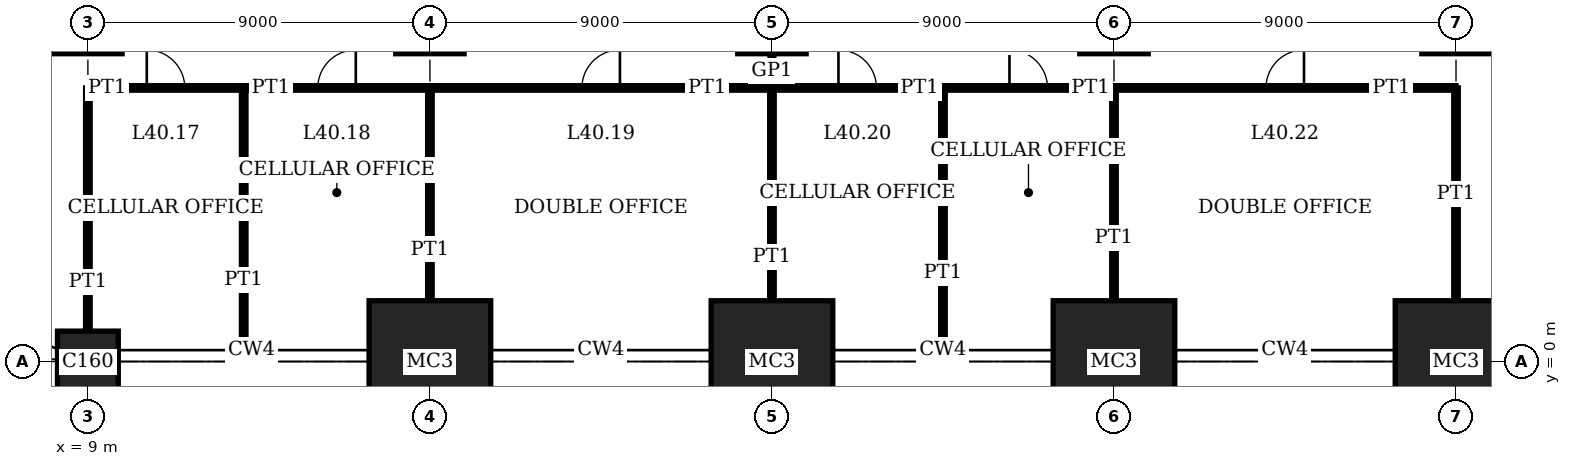
"""IFC4 building model, lengths in metres.
Left out: names, types, materials, properties, quantities, classifications, styles, units other than length and angle.
Written with IfcOpenShell. Run it as: python <this file> out.ifc"""

import sys

from ifc_helpers import new_model, si_unit, direction, frame, frame_2d, origin, origin_2d, place, context, subcontext, project, spatial, rectangle, extrude, element, fill, save


model = new_model("IFC4")
c1 = context("Model", 3, precision=1e-05, world=origin(), true_north=direction((0.0, 1.0)))
c2 = subcontext(c1, "Body", "Model", "MODEL_VIEW")
j1 = project(units=[si_unit("LENGTHUNIT", "METRE"), si_unit("PLANEANGLEUNIT", "RADIAN")], contexts=[c1])
p1 = place(None, origin())
s1 = spatial("IfcSite", under=j1, at=p1, CompositionType="ELEMENT")
p2 = place(p1, origin())
s2 = spatial("IfcBuilding", under=s1, at=p2, CompositionType="ELEMENT")
p3 = place(p2, frame((0.0, 0.0, 166.2)))
s3 = spatial("IfcBuildingStorey", under=s2, at=p3, CompositionType="ELEMENT", Elevation=166.2)
p4 = place(p3, frame((9.0, 0.0, 0.0), z_axis=(0.0, 0.0, 1.0), x_axis=(1.0, 0.0, 0.0)))
e1 = element("IfcColumn", 1, at=p4, inside=s3, PredefinedType="COLUMN", context=c2, shape_type="SweptSolid", body=[
    extrude(rectangle(XDim=1.6, YDim=1.6, at=origin_2d()), origin(), (0.0, 0.0, 1.0), 4.0),
])
p5 = place(p3, frame((9.0, 9.0, 0.0), z_axis=(0.0, 0.0, 1.0), x_axis=(1.0, 0.0, 0.0)))
e2 = element("IfcColumn", 2, at=p5, inside=s3, PredefinedType="COLUMN", context=c2, shape_type="SweptSolid", body=[
    extrude(rectangle(XDim=1.8, YDim=1.8, at=origin_2d()), origin(), (0.0, 0.0, 1.0), 4.0),
])
p6 = place(p3, frame((18.0, 0.0, 0.0), z_axis=(0.0, 0.0, 1.0), x_axis=(1.0, 0.0, 0.0)))
e3 = element("IfcColumn", 3, at=p6, inside=s3, PredefinedType="COLUMN", context=c2, shape_type="SweptSolid", body=[
    extrude(rectangle(XDim=3.2, YDim=3.2, at=origin_2d()), origin(), (0.0, 0.0, 1.0), 4.0),
])
p7 = place(p3, frame((18.0, 9.0, 0.0), z_axis=(0.0, 0.0, 1.0), x_axis=(1.0, 0.0, 0.0)))
e4 = element("IfcColumn", 4, at=p7, inside=s3, PredefinedType="COLUMN", context=c2, shape_type="SweptSolid", body=[
    extrude(rectangle(XDim=1.8, YDim=1.8, at=origin_2d()), origin(), (0.0, 0.0, 1.0), 4.0),
])
p8 = place(p3, frame((27.0, 0.0, 0.0), z_axis=(0.0, 0.0, 1.0), x_axis=(1.0, 0.0, 0.0)))
e5 = element("IfcColumn", 5, at=p8, inside=s3, PredefinedType="COLUMN", context=c2, shape_type="SweptSolid", body=[
    extrude(rectangle(XDim=3.2, YDim=3.2, at=origin_2d()), origin(), (0.0, 0.0, 1.0), 4.0),
])
p9 = place(p3, frame((27.0, 9.0, 0.0), z_axis=(0.0, 0.0, 1.0), x_axis=(1.0, 0.0, 0.0)))
e6 = element("IfcColumn", 6, at=p9, inside=s3, PredefinedType="COLUMN", context=c2, shape_type="SweptSolid", body=[
    extrude(rectangle(XDim=1.8, YDim=1.8, at=origin_2d()), origin(), (0.0, 0.0, 1.0), 4.0),
])
p10 = place(p3, frame((36.0, 0.0, 0.0), z_axis=(0.0, 0.0, 1.0), x_axis=(1.0, 0.0, 0.0)))
e7 = element("IfcColumn", 7, at=p10, inside=s3, PredefinedType="COLUMN", context=c2, shape_type="SweptSolid", body=[
    extrude(rectangle(XDim=3.2, YDim=3.2, at=origin_2d()), origin(), (0.0, 0.0, 1.0), 4.0),
])
p11 = place(p3, frame((36.0, 9.0, 0.0), z_axis=(0.0, 0.0, 1.0), x_axis=(1.0, 0.0, 0.0)))
e8 = element("IfcColumn", 8, at=p11, inside=s3, PredefinedType="COLUMN", context=c2, shape_type="SweptSolid", body=[
    extrude(rectangle(XDim=1.8, YDim=1.8, at=origin_2d()), origin(), (0.0, 0.0, 1.0), 4.0),
])
p12 = place(p3, frame((45.0, 0.0, 0.0), z_axis=(0.0, 0.0, 1.0), x_axis=(1.0, 0.0, 0.0)))
e9 = element("IfcColumn", 9, at=p12, inside=s3, PredefinedType="COLUMN", context=c2, shape_type="SweptSolid", body=[
    extrude(rectangle(XDim=3.2, YDim=3.2, at=origin_2d()), origin(), (0.0, 0.0, 1.0), 4.0),
])
p13 = place(p3, frame((45.0, 9.0, 0.0), z_axis=(0.0, 0.0, 1.0), x_axis=(1.0, 0.0, 0.0)))
e10 = element("IfcColumn", 10, at=p13, inside=s3, PredefinedType="COLUMN", context=c2, shape_type="SweptSolid", body=[
    extrude(rectangle(XDim=1.8, YDim=1.8, at=origin_2d()), origin(), (0.0, 0.0, 1.0), 4.0),
])
p14 = place(p3, frame((9.0, 7.2, 0.0), z_axis=(0.0, 0.0, 1.0), x_axis=(1.0, 0.0, 0.0)))
e11 = element("IfcWall", 11, at=p14, inside=s3, PredefinedType="PARTITIONING", context=c2, shape_type="SweptSolid", body=[
    extrude(rectangle(XDim=4.1, YDim=0.12, at=frame_2d((2.05, 0.0))), origin(), (0.0, 0.0, 1.0), 3.75),
])
p15 = place(p14, frame((1.55, 0.0, 0.0)))
e12 = element("IfcOpeningElement", 12, at=p15, cuts=e11, PredefinedType="OPENING", context=c2, shape_type="SweptSolid", body=[
    extrude(rectangle(XDim=1.0, YDim=2.4, at=frame_2d((0.5, 1.2))), frame((0.0, 0.07, 0.0), z_axis=(0.0, -1.0, 0.0), x_axis=(1.0, 0.0, 0.0)), (0.0, 0.0, 1.0), 0.14),
])
p16 = place(p3, frame((13.1, 7.2, 0.0), z_axis=(0.0, 0.0, 1.0), x_axis=(1.0, 0.0, 0.0)))
e13 = element("IfcWall", 13, at=p16, inside=s3, PredefinedType="PARTITIONING", context=c2, shape_type="SweptSolid", body=[
    extrude(rectangle(XDim=4.9, YDim=0.12, at=frame_2d((2.45, 0.0))), origin(), (0.0, 0.0, 1.0), 3.75),
])
p17 = place(p16, frame((1.95, 0.0, 0.0)))
e14 = element("IfcOpeningElement", 14, at=p17, cuts=e13, PredefinedType="OPENING", context=c2, shape_type="SweptSolid", body=[
    extrude(rectangle(XDim=1.0, YDim=2.4, at=frame_2d((0.5, 1.2))), frame((0.0, 0.07, 0.0), z_axis=(0.0, -1.0, 0.0), x_axis=(1.0, 0.0, 0.0)), (0.0, 0.0, 1.0), 0.14),
])
p18 = place(p3, frame((18.0, 7.2, 0.0), z_axis=(0.0, 0.0, 1.0), x_axis=(1.0, 0.0, 0.0)))
e15 = element("IfcWall", 15, at=p18, inside=s3, PredefinedType="PARTITIONING", context=c2, shape_type="SweptSolid", body=[
    extrude(rectangle(XDim=9.0, YDim=0.12, at=frame_2d((4.5, 0.0))), origin(), (0.0, 0.0, 1.0), 3.75),
])
p19 = place(p18, frame((4.0, 0.0, 0.0)))
e16 = element("IfcOpeningElement", 16, at=p19, cuts=e15, PredefinedType="OPENING", context=c2, shape_type="SweptSolid", body=[
    extrude(rectangle(XDim=1.0, YDim=2.4, at=frame_2d((0.5, 1.2))), frame((0.0, 0.07, 0.0), z_axis=(0.0, -1.0, 0.0), x_axis=(1.0, 0.0, 0.0)), (0.0, 0.0, 1.0), 0.14),
])
p20 = place(p3, frame((27.0, 7.2, 0.0), z_axis=(0.0, 0.0, 1.0), x_axis=(1.0, 0.0, 0.0)))
e17 = element("IfcWall", 17, at=p20, inside=s3, PredefinedType="PARTITIONING", context=c2, shape_type="SweptSolid", body=[
    extrude(rectangle(XDim=4.5, YDim=0.12, at=frame_2d((2.25, 0.0))), origin(), (0.0, 0.0, 1.0), 3.75),
])
p21 = place(p20, frame((1.75, 0.0, 0.0)))
e18 = element("IfcOpeningElement", 18, at=p21, cuts=e17, PredefinedType="OPENING", context=c2, shape_type="SweptSolid", body=[
    extrude(rectangle(XDim=1.0, YDim=2.4, at=frame_2d((0.5, 1.2))), frame((0.0, 0.07, 0.0), z_axis=(0.0, -1.0, 0.0), x_axis=(1.0, 0.0, 0.0)), (0.0, 0.0, 1.0), 0.14),
])
p22 = place(p3, frame((31.5, 7.2, 0.0), z_axis=(0.0, 0.0, 1.0), x_axis=(1.0, 0.0, 0.0)))
e19 = element("IfcWall", 19, at=p22, inside=s3, PredefinedType="PARTITIONING", context=c2, shape_type="SweptSolid", body=[
    extrude(rectangle(XDim=4.5, YDim=0.12, at=frame_2d((2.25, 0.0))), origin(), (0.0, 0.0, 1.0), 3.75),
])
p23 = place(p22, frame((1.75, 0.0, 0.0)))
e20 = element("IfcOpeningElement", 20, at=p23, cuts=e19, PredefinedType="OPENING", context=c2, shape_type="SweptSolid", body=[
    extrude(rectangle(XDim=1.0, YDim=2.4, at=frame_2d((0.5, 1.2))), frame((0.0, 0.07, 0.0), z_axis=(0.0, -1.0, 0.0), x_axis=(1.0, 0.0, 0.0)), (0.0, 0.0, 1.0), 0.14),
])
p24 = place(p3, frame((36.0, 7.2, 0.0), z_axis=(0.0, 0.0, 1.0), x_axis=(1.0, 0.0, 0.0)))
e21 = element("IfcWall", 21, at=p24, inside=s3, PredefinedType="PARTITIONING", context=c2, shape_type="SweptSolid", body=[
    extrude(rectangle(XDim=9.0, YDim=0.12, at=frame_2d((4.5, 0.0))), origin(), (0.0, 0.0, 1.0), 3.75),
])
p25 = place(p24, frame((4.0, 0.0, 0.0)))
e22 = element("IfcOpeningElement", 22, at=p25, cuts=e21, PredefinedType="OPENING", context=c2, shape_type="SweptSolid", body=[
    extrude(rectangle(XDim=1.0, YDim=2.4, at=frame_2d((0.5, 1.2))), frame((0.0, 0.07, 0.0), z_axis=(0.0, -1.0, 0.0), x_axis=(1.0, 0.0, 0.0)), (0.0, 0.0, 1.0), 0.14),
])
p26 = place(p3, frame((9.0, 0.8, 0.0), z_axis=(0.0, 0.0, 1.0), x_axis=(0.0, 1.0, 0.0)))
e23 = element("IfcWall", 23, at=p26, inside=s3, PredefinedType="PARTITIONING", context=c2, shape_type="SweptSolid", body=[
    extrude(rectangle(XDim=6.4, YDim=0.12, at=frame_2d((3.2, 0.0))), origin(), (0.0, 0.0, 1.0), 3.05),
])
p27 = place(p3, frame((13.1, 0.31, 0.0), z_axis=(0.0, 0.0, 1.0), x_axis=(0.0, 1.0, 0.0)))
e24 = element("IfcWall", 24, at=p27, inside=s3, PredefinedType="PARTITIONING", context=c2, shape_type="SweptSolid", body=[
    extrude(rectangle(XDim=6.89, YDim=0.12, at=frame_2d((3.445, 0.0))), origin(), (0.0, 0.0, 1.0), 3.75),
])
for number, where, z_axis, x_axis in (
    (25, (18.0, 1.6, 0.0), (0.0, 0.0, 1.0), (0.0, 1.0, 0.0)),
    (26, (27.0, 1.6, 0.0), (0.0, 0.0, 1.0), (0.0, 1.0, 0.0)),
):
    element("IfcWall", number, at=place(p3, frame(where, z_axis=z_axis, x_axis=x_axis)), inside=s3, PredefinedType="PARTITIONING", context=c2, shape_type="SweptSolid", body=[
        extrude(rectangle(XDim=5.6, YDim=0.12, at=frame_2d((2.8, 0.0))), origin(), (0.0, 0.0, 1.0), 3.05),
    ])
p28 = place(p3, frame((27.0, 7.2, 0.0), z_axis=(0.0, 0.0, 1.0), x_axis=(0.0, 1.0, 0.0)))
e27 = element("IfcWall", 27, at=p28, inside=s3, PredefinedType="PARTITIONING", context=c2, shape_type="SweptSolid", body=[
    extrude(rectangle(XDim=0.9, YDim=0.1, at=frame_2d((0.45, 0.0))), origin(), (0.0, 0.0, 1.0), 3.05),
])
p29 = place(p3, frame((31.5, 0.31, 0.0), z_axis=(0.0, 0.0, 1.0), x_axis=(0.0, 1.0, 0.0)))
e28 = element("IfcWall", 28, at=p29, inside=s3, PredefinedType="PARTITIONING", context=c2, shape_type="SweptSolid", body=[
    extrude(rectangle(XDim=6.89, YDim=0.12, at=frame_2d((3.445, 0.0))), origin(), (0.0, 0.0, 1.0), 3.75),
])
for number, where, z_axis, x_axis in (
    (29, (36.0, 1.6, 0.0), (0.0, 0.0, 1.0), (0.0, 1.0, 0.0)),
    (30, (45.0, 1.6, 0.0), (0.0, 0.0, 1.0), (0.0, 1.0, 0.0)),
):
    element("IfcWall", number, at=place(p3, frame(where, z_axis=z_axis, x_axis=x_axis)), inside=s3, PredefinedType="PARTITIONING", context=c2, shape_type="SweptSolid", body=[
        extrude(rectangle(XDim=5.6, YDim=0.12, at=frame_2d((2.8, 0.0))), origin(), (0.0, 0.0, 1.0), 3.05),
    ])
p30 = place(p15, origin())
e31 = element("IfcDoor", 31, at=p30, inside=s3, OperationType="SINGLE_SWING_RIGHT", PredefinedType="DOOR", context=c2, shape_type="SweptSolid", body=[
    extrude(rectangle(XDim=1.0, YDim=2.4, at=frame_2d((0.5, 1.2))), frame((0.0, 0.025, 0.0), z_axis=(0.0, -1.0, 0.0), x_axis=(1.0, 0.0, 0.0)), (0.0, 0.0, 1.0), 0.05),
])
fill(e12, e31)
p31 = place(p17, origin())
e32 = element("IfcDoor", 32, at=p31, inside=s3, OperationType="SINGLE_SWING_LEFT", PredefinedType="DOOR", context=c2, shape_type="SweptSolid", body=[
    extrude(rectangle(XDim=1.0, YDim=2.4, at=frame_2d((0.5, 1.2))), frame((0.0, 0.025, 0.0), z_axis=(0.0, -1.0, 0.0), x_axis=(1.0, 0.0, 0.0)), (0.0, 0.0, 1.0), 0.05),
])
fill(e14, e32)
p32 = place(p19, origin())
e33 = element("IfcDoor", 33, at=p32, inside=s3, OperationType="SINGLE_SWING_LEFT", PredefinedType="DOOR", context=c2, shape_type="SweptSolid", body=[
    extrude(rectangle(XDim=1.0, YDim=2.4, at=frame_2d((0.5, 1.2))), frame((0.0, 0.025, 0.0), z_axis=(0.0, -1.0, 0.0), x_axis=(1.0, 0.0, 0.0)), (0.0, 0.0, 1.0), 0.05),
])
fill(e16, e33)
p33 = place(p21, origin())
e34 = element("IfcDoor", 34, at=p33, inside=s3, OperationType="SINGLE_SWING_RIGHT", PredefinedType="DOOR", context=c2, shape_type="SweptSolid", body=[
    extrude(rectangle(XDim=1.0, YDim=2.4, at=frame_2d((0.5, 1.2))), frame((0.0, 0.025, 0.0), z_axis=(0.0, -1.0, 0.0), x_axis=(1.0, 0.0, 0.0)), (0.0, 0.0, 1.0), 0.05),
])
fill(e18, e34)
p34 = place(p23, origin())
e35 = element("IfcDoor", 35, at=p34, inside=s3, OperationType="SINGLE_SWING_RIGHT", PredefinedType="DOOR", context=c2, shape_type="SweptSolid", body=[
    extrude(rectangle(XDim=1.0, YDim=2.4, at=frame_2d((0.5, 1.2))), frame((0.0, 0.025, 0.0), z_axis=(0.0, -1.0, 0.0), x_axis=(1.0, 0.0, 0.0)), (0.0, 0.0, 1.0), 0.05),
])
fill(e20, e35)
p35 = place(p25, origin())
e36 = element("IfcDoor", 36, at=p35, inside=s3, OperationType="SINGLE_SWING_LEFT", PredefinedType="DOOR", context=c2, shape_type="SweptSolid", body=[
    extrude(rectangle(XDim=1.0, YDim=2.4, at=frame_2d((0.5, 1.2))), frame((0.0, 0.025, 0.0), z_axis=(0.0, -1.0, 0.0), x_axis=(1.0, 0.0, 0.0)), (0.0, 0.0, 1.0), 0.05),
])
fill(e22, e36)
save(model, sys.argv[1])
